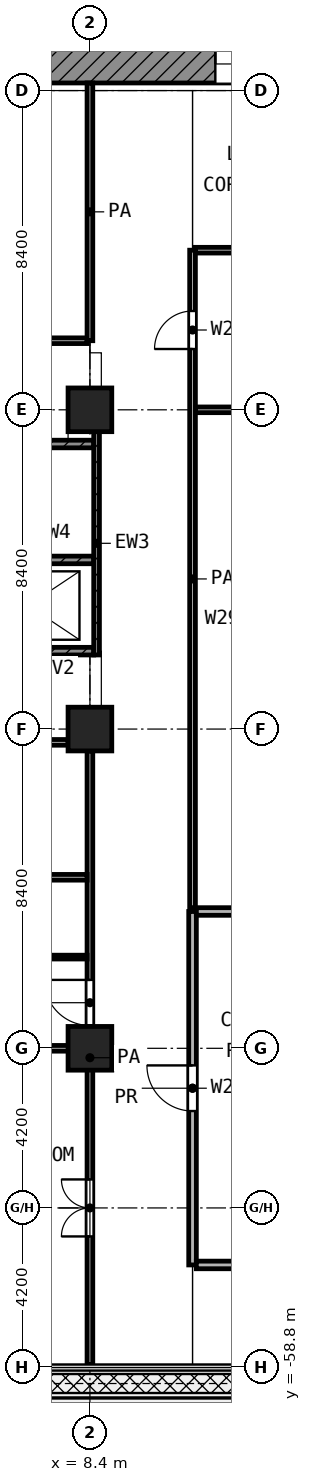
"""IFC4 building model, lengths in metres.
Left out: names, types, materials, properties, quantities, classifications, styles, units other than length and angle.
Written with IfcOpenShell. Run it as: python <this file> out.ifc"""

import sys

from ifc_helpers import new_model, si_unit, direction, frame, frame_2d, origin, origin_2d, place, context, subcontext, project, spatial, rectangle, extrude, element, fill, save


model = new_model("IFC4")
c1 = context("Model", 3, precision=1e-05, world=origin(), true_north=direction((0.0, 1.0)))
c2 = subcontext(c1, "Body", "Model", "MODEL_VIEW")
j1 = project(units=[si_unit("LENGTHUNIT", "METRE"), si_unit("PLANEANGLEUNIT", "RADIAN")], contexts=[c1])
p1 = place(None, origin())
s1 = spatial("IfcSite", under=j1, at=p1, CompositionType="ELEMENT")
p2 = place(p1, origin())
s2 = spatial("IfcBuilding", under=s1, at=p2, CompositionType="ELEMENT")
p3 = place(p2, frame((0.0, 0.0, 149.2)))
s3 = spatial("IfcBuildingStorey", under=s2, at=p3, CompositionType="ELEMENT", Elevation=149.2)
for number, where, z_axis, x_axis in (
    (1, (8.4, -33.6, 0.0), (0.0, 0.0, 1.0), (1.0, 0.0, 0.0)),
    (2, (8.4, -42.0, 0.0), (0.0, 0.0, 1.0), (1.0, 0.0, 0.0)),
    (3, (8.4, -50.4, 0.0), (0.0, 0.0, 1.0), (1.0, 0.0, 0.0)),
):
    element("IfcColumn", number, at=place(p3, frame(where, z_axis=z_axis, x_axis=x_axis)), inside=s3, PredefinedType="COLUMN", context=c2, shape_type="SweptSolid", body=[
        extrude(rectangle(XDim=1.15, YDim=1.15, at=origin_2d()), origin(), (0.0, 0.0, 1.0), 4.2),
    ])
p4 = place(p3, frame((5.4, -24.5, 0.0), z_axis=(0.0, 0.0, 1.0), x_axis=(1.0, 0.0, 0.0)))
e4 = element("IfcWall", 4, at=p4, inside=s3, PredefinedType="SHEAR", context=c2, shape_type="SweptSolid", body=[
    extrude(rectangle(XDim=18.6, YDim=1.0, at=frame_2d((9.3, 0.0))), origin(), (0.0, 0.0, 1.0), 3.7),
])
p5 = place(p4, frame((6.3, 0.0, 0.0)))
e5 = element("IfcOpeningElement", 5, at=p5, cuts=e4, PredefinedType="OPENING", context=c2, shape_type="SweptSolid", body=[
    extrude(rectangle(XDim=1.8, YDim=2.1, at=frame_2d((0.9, 1.05))), frame((0.0, 0.51, 0.0), z_axis=(0.0, -1.0, 0.0), x_axis=(1.0, 0.0, 0.0)), (0.0, 0.0, 1.0), 1.02),
])
p6 = place(p3, frame((8.575, -40.05, 0.0), z_axis=(0.0, 0.0, 1.0), x_axis=(0.0, 1.0, 0.0)))
e6 = element("IfcWall", 6, at=p6, inside=s3, PredefinedType="SHEAR", context=c2, shape_type="SweptSolid", body=[
    extrude(rectangle(XDim=5.875, YDim=0.15, at=frame_2d((2.938, 0.0))), origin(), (0.0, 0.0, 1.0), 3.7),
])
p7 = place(p3, frame((0.45, -34.5, 0.0), z_axis=(0.0, 0.0, 1.0), x_axis=(1.0, 0.0, 0.0)))
e7 = element("IfcWall", 7, at=p7, inside=s3, PredefinedType="SHEAR", context=c2, shape_type="SweptSolid", body=[
    extrude(rectangle(XDim=8.05, YDim=0.2, at=frame_2d((4.025, 0.0))), origin(), (0.0, 0.0, 1.0), 3.7),
])
p8 = place(p7, frame((0.75, 0.0, 0.0)))
e8 = element("IfcOpeningElement", 8, at=p8, cuts=e7, PredefinedType="OPENING", context=c2, shape_type="SweptSolid", body=[
    extrude(rectangle(XDim=1.1, YDim=2.1, at=frame_2d((0.55, 1.05))), frame((0.0, 0.11, 0.0), z_axis=(0.0, -1.0, 0.0), x_axis=(1.0, 0.0, 0.0)), (0.0, 0.0, 1.0), 0.22),
])
p9 = place(p3, frame((0.45, -37.55, 0.0), z_axis=(0.0, 0.0, 1.0), x_axis=(1.0, 0.0, 0.0)))
e9 = element("IfcWall", 9, at=p9, inside=s3, PredefinedType="SHEAR", context=c2, shape_type="SweptSolid", body=[
    extrude(rectangle(XDim=8.05, YDim=0.2, at=frame_2d((4.025, 0.0))), origin(), (0.0, 0.0, 1.0), 3.7),
])
p10 = place(p9, frame((0.1, 0.0, 0.0)))
e10 = element("IfcOpeningElement", 10, at=p10, cuts=e9, PredefinedType="OPENING", context=c2, shape_type="SweptSolid", body=[
    extrude(rectangle(XDim=1.1, YDim=2.1, at=frame_2d((0.55, 1.05))), frame((0.0, 0.11, 0.0), z_axis=(0.0, -1.0, 0.0), x_axis=(1.0, 0.0, 0.0)), (0.0, 0.0, 1.0), 0.22),
])
p11 = place(p3, frame((0.45, -39.95, 0.0), z_axis=(0.0, 0.0, 1.0), x_axis=(1.0, 0.0, 0.0)))
e11 = element("IfcWall", 11, at=p11, inside=s3, PredefinedType="SHEAR", context=c2, shape_type="SweptSolid", body=[
    extrude(rectangle(XDim=8.05, YDim=0.2, at=frame_2d((4.025, 0.0))), origin(), (0.0, 0.0, 1.0), 3.7),
])
p12 = place(p11, frame((2.0, 0.0, 0.0)))
e12 = element("IfcOpeningElement", 12, at=p12, cuts=e11, PredefinedType="OPENING", context=c2, shape_type="SweptSolid", body=[
    extrude(rectangle(XDim=1.1, YDim=2.1, at=frame_2d((0.55, 1.05))), frame((0.0, 0.11, 0.0), z_axis=(0.0, -1.0, 0.0), x_axis=(1.0, 0.0, 0.0)), (0.0, 0.0, 1.0), 0.22),
])
p13 = place(p3, frame((5.75, -48.0, 0.0), z_axis=(0.0, 0.0, 1.0), x_axis=(1.0, 0.0, 0.0)))
e13 = element("IfcWall", 13, at=p13, inside=s3, PredefinedType="PARTITIONING", context=c2, shape_type="SweptSolid", body=[
    extrude(rectangle(XDim=2.575, YDim=0.1, at=frame_2d((1.288, 0.0))), origin(), (0.0, 0.0, 1.0), 3.7),
])
for number, where, z_axis, x_axis in (
    (14, (0.08, -50.4, 0.0), (0.0, 0.0, 1.0), (1.0, 0.0, 0.0)),
    (15, (0.08, -45.9, 0.0), (0.0, 0.0, 1.0), (1.0, 0.0, 0.0)),
):
    element("IfcWall", number, at=place(p3, frame(where, z_axis=z_axis, x_axis=x_axis)), inside=s3, PredefinedType="PARTITIONING", context=c2, shape_type="SweptSolid", body=[
        extrude(rectangle(XDim=8.245, YDim=0.15, at=frame_2d((4.123, 0.0))), origin(), (0.0, 0.0, 1.0), 3.7),
    ])
p14 = place(p3, frame((2.327, -42.35, 0.0), z_axis=(0.0, 0.0, 1.0), x_axis=(1.0, 0.0, 0.0)))
e16 = element("IfcWall", 16, at=p14, inside=s3, PredefinedType="PARTITIONING", context=c2, shape_type="SweptSolid", body=[
    extrude(rectangle(XDim=5.498, YDim=0.15, at=frame_2d((2.749, 0.0))), origin(), (0.0, 0.0, 1.0), 3.7),
])
p15 = place(p14, frame((2.261, 0.0, 0.0)))
e17 = element("IfcOpeningElement", 17, at=p15, cuts=e16, PredefinedType="OPENING", context=c2, shape_type="SweptSolid", body=[
    extrude(rectangle(XDim=0.9, YDim=2.1, at=frame_2d((0.45, 1.05))), frame((0.0, 0.085, 0.0), z_axis=(0.0, -1.0, 0.0), x_axis=(1.0, 0.0, 0.0)), (0.0, 0.0, 1.0), 0.17),
])
p16 = place(p3, frame((11.175, -33.6, 0.0), z_axis=(0.0, 0.0, 1.0), x_axis=(1.0, 0.0, 0.0)))
e18 = element("IfcWall", 18, at=p16, inside=s3, PredefinedType="PARTITIONING", context=c2, shape_type="SweptSolid", body=[
    extrude(rectangle(XDim=2.85, YDim=0.15, at=frame_2d((1.425, 0.0))), origin(), (0.0, 0.0, 1.0), 3.7),
])
p17 = place(p3, frame((1.079, -31.782, 0.0), z_axis=(0.0, 0.0, 1.0), x_axis=(1.0, 0.0, 0.0)))
e19 = element("IfcWall", 19, at=p17, inside=s3, PredefinedType="PARTITIONING", context=c2, shape_type="SweptSolid", body=[
    extrude(rectangle(XDim=7.246, YDim=0.15, at=frame_2d((3.623, 0.0))), origin(), (0.0, 0.0, 1.0), 3.7),
])
p18 = place(p17, frame((2.873, 0.0, 0.0)))
e20 = element("IfcOpeningElement", 20, at=p18, cuts=e19, PredefinedType="OPENING", context=c2, shape_type="SweptSolid", body=[
    extrude(rectangle(XDim=1.5, YDim=2.1, at=frame_2d((0.75, 1.05))), frame((0.0, 0.085, 0.0), z_axis=(0.0, -1.0, 0.0), x_axis=(1.0, 0.0, 0.0)), (0.0, 0.0, 1.0), 0.17),
])
p19 = place(p3, frame((11.175, -29.4, 0.0), z_axis=(0.0, 0.0, 1.0), x_axis=(1.0, 0.0, 0.0)))
e21 = element("IfcWall", 21, at=p19, inside=s3, PredefinedType="PARTITIONING", context=c2, shape_type="SweptSolid", body=[
    extrude(rectangle(XDim=2.85, YDim=0.15, at=frame_2d((1.425, 0.0))), origin(), (0.0, 0.0, 1.0), 3.7),
])
p20 = place(p3, frame((8.4, -58.72, 0.0), z_axis=(0.0, 0.0, 1.0), x_axis=(0.0, 1.0, 0.0)))
e22 = element("IfcWall", 22, at=p20, inside=s3, PredefinedType="PARTITIONING", context=c2, shape_type="SweptSolid", body=[
    extrude(rectangle(XDim=16.145, YDim=0.15, at=frame_2d((8.073, 0.0))), origin(), (0.0, 0.0, 1.0), 3.7),
])
p21 = place(p20, frame((8.92, 0.0, 0.0)))
e23 = element("IfcOpeningElement", 23, at=p21, cuts=e22, PredefinedType="OPENING", context=c2, shape_type="SweptSolid", body=[
    extrude(rectangle(XDim=1.2, YDim=2.1, at=frame_2d((0.6, 1.05))), frame((0.0, 0.085, 0.0), z_axis=(0.0, -1.0, 0.0), x_axis=(1.0, 0.0, 0.0)), (0.0, 0.0, 1.0), 0.17),
])
p22 = place(p20, frame((3.37, 0.0, 0.0)))
e24 = element("IfcOpeningElement", 24, at=p22, cuts=e22, PredefinedType="OPENING", context=c2, shape_type="SweptSolid", body=[
    extrude(rectangle(XDim=1.5, YDim=2.1, at=frame_2d((0.75, 1.05))), frame((0.0, 0.085, 0.0), z_axis=(0.0, -1.0, 0.0), x_axis=(1.0, 0.0, 0.0)), (0.0, 0.0, 1.0), 0.17),
])
p23 = place(p3, frame((8.4, -31.782, 0.0), z_axis=(0.0, 0.0, 1.0), x_axis=(0.0, 1.0, 0.0)))
e25 = element("IfcWall", 25, at=p23, inside=s3, PredefinedType="PARTITIONING", context=c2, shape_type="SweptSolid", body=[
    extrude(rectangle(XDim=6.782, YDim=0.15, at=frame_2d((3.391, 0.0))), origin(), (0.0, 0.0, 1.0), 3.7),
])
p24 = place(p3, frame((11.1, -46.7, 0.0), z_axis=(0.0, 0.0, 1.0), x_axis=(0.0, 1.0, 0.0)))
e26 = element("IfcWall", 26, at=p24, inside=s3, PredefinedType="PARTITIONING", context=c2, shape_type="SweptSolid", body=[
    extrude(rectangle(XDim=17.3, YDim=0.15, at=frame_2d((8.65, 0.0))), origin(), (0.0, 0.0, 1.0), 3.7),
])
p25 = place(p24, frame((14.7, 0.0, 0.0)))
e27 = element("IfcOpeningElement", 27, at=p25, cuts=e26, PredefinedType="OPENING", context=c2, shape_type="SweptSolid", body=[
    extrude(rectangle(XDim=1.0, YDim=2.1, at=frame_2d((0.5, 1.05))), frame((0.0, 0.085, 0.0), z_axis=(0.0, -1.0, 0.0), x_axis=(1.0, 0.0, 0.0)), (0.0, 0.0, 1.0), 0.17),
])
for number, where, z_axis, x_axis in (
    (28, (11.2, -56.1, 0.0), (0.0, 0.0, 1.0), (1.0, 0.0, 0.0)),
    (29, (11.2, -46.8, 0.0), (0.0, 0.0, 1.0), (1.0, 0.0, 0.0)),
):
    element("IfcWall", number, at=place(p3, frame(where, z_axis=z_axis, x_axis=x_axis)), inside=s3, PredefinedType="PARTITIONING", context=c2, shape_type="SweptSolid", body=[
        extrude(rectangle(XDim=2.8, YDim=0.2, at=frame_2d((1.4, 0.0))), origin(), (0.0, 0.0, 1.0), 3.7),
    ])
p26 = place(p3, frame((11.1, -56.1, 0.0), z_axis=(0.0, 0.0, 1.0), x_axis=(0.0, 1.0, 0.0)))
e30 = element("IfcWall", 30, at=p26, inside=s3, PredefinedType="PARTITIONING", context=c2, shape_type="SweptSolid", body=[
    extrude(rectangle(XDim=9.3, YDim=0.2, at=frame_2d((4.65, 0.0))), origin(), (0.0, 0.0, 1.0), 3.7),
])
p27 = place(p26, frame((4.05, 0.0, 0.0)))
e31 = element("IfcOpeningElement", 31, at=p27, cuts=e30, PredefinedType="OPENING", context=c2, shape_type="SweptSolid", body=[
    extrude(rectangle(XDim=1.2, YDim=2.1, at=frame_2d((0.6, 1.05))), frame((0.0, 0.11, 0.0), z_axis=(0.0, -1.0, 0.0), x_axis=(1.0, 0.0, 0.0)), (0.0, 0.0, 1.0), 0.22),
])
p28 = place(p5, origin())
e32 = element("IfcDoor", 32, at=p28, inside=s3, OperationType="DOUBLE_DOOR_SINGLE_SWING", PredefinedType="DOOR", context=c2, shape_type="SweptSolid", body=[
    extrude(rectangle(XDim=1.8, YDim=2.1, at=frame_2d((0.9, 1.05))), frame((0.0, 0.025, 0.0), z_axis=(0.0, -1.0, 0.0), x_axis=(1.0, 0.0, 0.0)), (0.0, 0.0, 1.0), 0.05),
])
fill(e5, e32)
p29 = place(p21, origin())
e33 = element("IfcDoor", 33, at=p29, inside=s3, OperationType="SINGLE_SWING_RIGHT", PredefinedType="DOOR", context=c2, shape_type="SweptSolid", body=[
    extrude(rectangle(XDim=1.2, YDim=2.1, at=frame_2d((0.6, 1.05))), frame((0.0, 0.025, 0.0), z_axis=(0.0, -1.0, 0.0), x_axis=(1.0, 0.0, 0.0)), (0.0, 0.0, 1.0), 0.05),
])
fill(e23, e33)
p30 = place(p22, origin())
e34 = element("IfcDoor", 34, at=p30, inside=s3, OperationType="DOUBLE_DOOR_SINGLE_SWING", PredefinedType="DOOR", context=c2, shape_type="SweptSolid", body=[
    extrude(rectangle(XDim=1.5, YDim=2.1, at=frame_2d((0.75, 1.05))), frame((0.0, 0.025, 0.0), z_axis=(0.0, -1.0, 0.0), x_axis=(1.0, 0.0, 0.0)), (0.0, 0.0, 1.0), 0.05),
])
fill(e24, e34)
p31 = place(p25, origin())
e35 = element("IfcDoor", 35, at=p31, inside=s3, OperationType="SINGLE_SWING_LEFT", PredefinedType="DOOR", context=c2, shape_type="SweptSolid", body=[
    extrude(rectangle(XDim=1.0, YDim=2.1, at=frame_2d((0.5, 1.05))), frame((0.0, 0.025, 0.0), z_axis=(0.0, -1.0, 0.0), x_axis=(1.0, 0.0, 0.0)), (0.0, 0.0, 1.0), 0.05),
])
fill(e27, e35)
p32 = place(p27, origin())
e36 = element("IfcDoor", 36, at=p32, inside=s3, OperationType="SINGLE_SWING_RIGHT", PredefinedType="DOOR", context=c2, shape_type="SweptSolid", body=[
    extrude(rectangle(XDim=1.2, YDim=2.1, at=frame_2d((0.6, 1.05))), frame((0.0, 0.025, 0.0), z_axis=(0.0, -1.0, 0.0), x_axis=(1.0, 0.0, 0.0)), (0.0, 0.0, 1.0), 0.05),
])
fill(e31, e36)
save(model, sys.argv[1])
